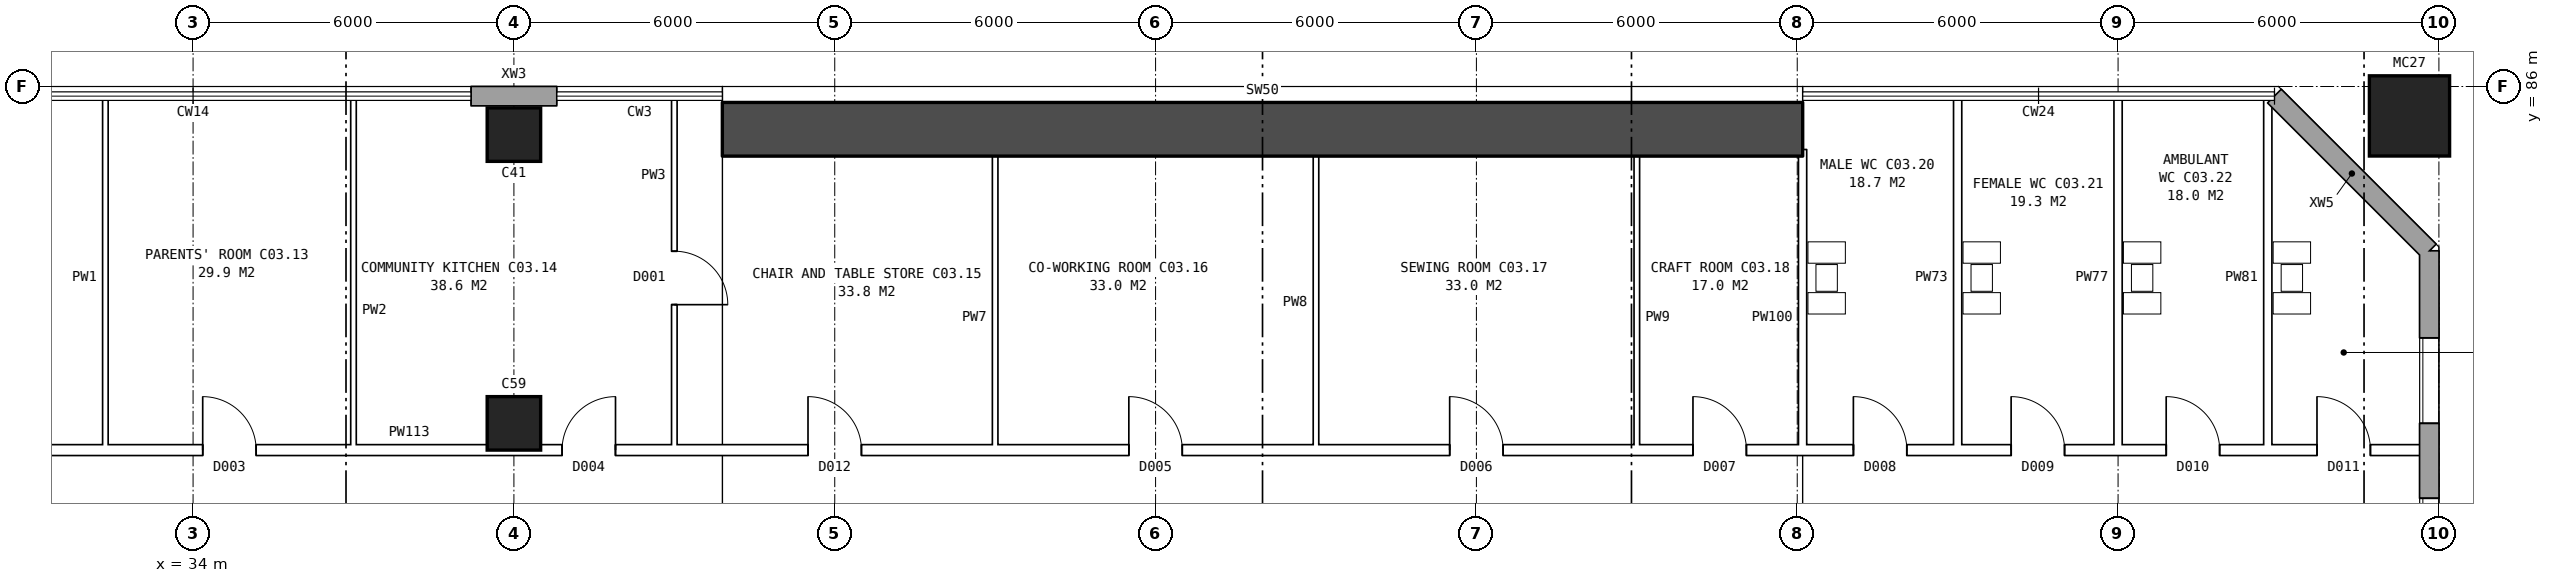
"""IFC4 building model, lengths in metres.
Left out: names, types, materials, properties, quantities, classifications, styles, units other than length and angle.
Written with IfcOpenShell. Run it as: python <this file> out.ifc"""

import sys

from ifc_helpers import new_model, si_unit, direction, frame, frame_2d, origin, origin_2d, place, context, subcontext, project, spatial, rectangle, hollow_rectangle, extrude, element, fill, save


model = new_model("IFC4")
c1 = context("Model", 3, precision=1e-05, world=origin(), true_north=direction((0.0, 1.0)))
c2 = subcontext(c1, "Body", "Model", "MODEL_VIEW")
j1 = project(units=[si_unit("LENGTHUNIT", "METRE"), si_unit("PLANEANGLEUNIT", "RADIAN")], contexts=[c1])
p1 = place(None, origin())
s1 = spatial("IfcSite", under=j1, at=p1, CompositionType="ELEMENT")
p2 = place(p1, origin())
s2 = spatial("IfcBuilding", under=s1, at=p2, CompositionType="ELEMENT")
p3 = place(p2, frame((0.0, 0.0, 14.7)))
s3 = spatial("IfcBuildingStorey", under=s2, at=p3, CompositionType="ELEMENT", Elevation=14.7)
p4 = place(p3, frame((43.9, 85.2, 0.0), z_axis=(0.0, 0.0, 1.0), x_axis=(1.0, 0.0, 0.0)))
e1 = element("IfcWall", 1, at=p4, inside=s3, PredefinedType="SHEAR", context=c2, shape_type="SweptSolid", body=[
    extrude(rectangle(XDim=20.2, YDim=1.0, at=frame_2d((10.1, 0.0))), origin(), (0.0, 0.0, 1.0), 4.0),
])
for number, where, z_axis, x_axis in (
    (2, (40.0, 79.7, 0.0), (0.0, 0.0, 1.0), (1.0, 0.0, 0.0)),
    (3, (40.0, 85.1, 0.0), (0.0, 0.0, 1.0), (1.0, 0.0, 0.0)),
):
    element("IfcColumn", number, at=place(p3, frame(where, z_axis=z_axis, x_axis=x_axis)), inside=s3, PredefinedType="COLUMN", context=c2, shape_type="SweptSolid", body=[
        extrude(rectangle(XDim=1.0, YDim=1.0, at=origin_2d()), origin(), (0.0, 0.0, 1.0), 4.0),
    ])
p5 = place(p3, frame((75.45, 85.45, 0.0), z_axis=(0.0, 0.0, 1.0), x_axis=(1.0, 0.0, 0.0)))
e4 = element("IfcColumn", 4, at=p5, inside=s3, PredefinedType="COLUMN", context=c2, shape_type="SweptSolid", body=[
    extrude(hollow_rectangle(XDim=1.5, YDim=1.5, WallThickness=0.08, at=origin_2d()), origin(), (0.0, 0.0, 1.0), 4.8),
])
p6 = place(p3, frame((75.82, 57.075, 0.0), z_axis=(0.0, 0.0, 1.0), x_axis=(0.0, 1.0, 0.0)))
e5 = element("IfcWall", 5, at=p6, inside=s3, PredefinedType="STANDARD", context=c2, shape_type="SweptSolid", body=[
    extrude(rectangle(XDim=25.851, YDim=0.36, at=frame_2d((12.925, 0.0))), origin(), (0.0, 0.0, 1.0), 4.0),
])
p7 = place(p6, frame((1.625, 0.0, 0.8)))
e6 = element("IfcOpeningElement", 6, at=p7, cuts=e5, PredefinedType="OPENING", context=c2, shape_type="SweptSolid", body=[
    extrude(rectangle(XDim=1.6, YDim=1.8, at=frame_2d((0.8, 0.9))), frame((0.0, 0.19, 0.0), z_axis=(0.0, -1.0, 0.0), x_axis=(1.0, 0.0, 0.0)), (0.0, 0.0, 1.0), 0.38),
])
p8 = place(p6, frame((4.625, 0.0, 0.8)))
e7 = element("IfcOpeningElement", 7, at=p8, cuts=e5, PredefinedType="OPENING", context=c2, shape_type="SweptSolid", body=[
    extrude(rectangle(XDim=1.6, YDim=1.8, at=frame_2d((0.8, 0.9))), frame((0.0, 0.19, 0.0), z_axis=(0.0, -1.0, 0.0), x_axis=(1.0, 0.0, 0.0)), (0.0, 0.0, 1.0), 0.38),
])
p9 = place(p6, frame((19.625, 0.0, 0.8)))
e8 = element("IfcOpeningElement", 8, at=p9, cuts=e5, PredefinedType="OPENING", context=c2, shape_type="SweptSolid", body=[
    extrude(rectangle(XDim=1.6, YDim=1.8, at=frame_2d((0.8, 0.9))), frame((0.0, 0.19, 0.0), z_axis=(0.0, -1.0, 0.0), x_axis=(1.0, 0.0, 0.0)), (0.0, 0.0, 1.0), 0.38),
])
p10 = place(p6, frame((22.625, 0.0, 0.8)))
e9 = element("IfcOpeningElement", 9, at=p10, cuts=e5, PredefinedType="OPENING", context=c2, shape_type="SweptSolid", body=[
    extrude(rectangle(XDim=1.6, YDim=1.8, at=frame_2d((0.8, 0.9))), frame((0.0, 0.19, 0.0), z_axis=(0.0, -1.0, 0.0), x_axis=(1.0, 0.0, 0.0)), (0.0, 0.0, 1.0), 0.38),
])
p11 = place(p3, frame((75.82, 82.925, 0.0), z_axis=(0.0, 0.0, 1.0), x_axis=(-0.707106781187, 0.707106781187, 0.0)))
e10 = element("IfcWall", 10, at=p11, inside=s3, PredefinedType="STANDARD", context=c2, shape_type="SweptSolid", body=[
    extrude(rectangle(XDim=4.094, YDim=0.36, at=frame_2d((2.047, 0.0))), origin(), (0.0, 0.0, 1.0), 4.0),
])
p12 = place(p3, frame((40.8, 85.82, 0.0), z_axis=(0.0, 0.0, 1.0), x_axis=(-1.0, 0.0, 0.0)))
e11 = element("IfcWall", 11, at=p12, inside=s3, PredefinedType="STANDARD", context=c2, shape_type="SweptSolid", body=[
    extrude(rectangle(XDim=1.6, YDim=0.36, at=frame_2d((0.8, 0.0))), origin(), (0.0, 0.0, 1.0), 4.0),
])
p13 = place(p3, frame((28.398, 79.2, 0.0), z_axis=(0.0, 0.0, 1.0), x_axis=(1.0, 0.0, 0.0)))
e12 = element("IfcWall", 12, at=p13, inside=s3, PredefinedType="PARTITIONING", context=c2, shape_type="SweptSolid", body=[
    extrude(rectangle(XDim=47.362, YDim=0.2, at=frame_2d((23.681, 0.0))), origin(), (0.0, 0.0, 1.0), 4.0),
])
p14 = place(p13, frame((1.531, 0.0, 0.0)))
e13 = element("IfcOpeningElement", 13, at=p14, cuts=e12, PredefinedType="OPENING", context=c2, shape_type="SweptSolid", body=[
    extrude(rectangle(XDim=1.0, YDim=2.1, at=frame_2d((0.5, 1.05))), frame((0.0, 0.11, 0.0), z_axis=(0.0, -1.0, 0.0), x_axis=(1.0, 0.0, 0.0)), (0.0, 0.0, 1.0), 0.22),
])
p15 = place(p13, frame((5.782, 0.0, 0.0)))
e14 = element("IfcOpeningElement", 14, at=p15, cuts=e12, PredefinedType="OPENING", context=c2, shape_type="SweptSolid", body=[
    extrude(rectangle(XDim=1.0, YDim=2.1, at=frame_2d((0.5, 1.05))), frame((0.0, 0.11, 0.0), z_axis=(0.0, -1.0, 0.0), x_axis=(1.0, 0.0, 0.0)), (0.0, 0.0, 1.0), 0.22),
])
p16 = place(p13, frame((12.502, 0.0, 0.0)))
e15 = element("IfcOpeningElement", 15, at=p16, cuts=e12, PredefinedType="OPENING", context=c2, shape_type="SweptSolid", body=[
    extrude(rectangle(XDim=1.0, YDim=2.1, at=frame_2d((0.5, 1.05))), frame((0.0, 0.11, 0.0), z_axis=(0.0, -1.0, 0.0), x_axis=(1.0, 0.0, 0.0)), (0.0, 0.0, 1.0), 0.22),
])
p17 = place(p13, frame((17.102, 0.0, 0.0)))
e16 = element("IfcOpeningElement", 16, at=p17, cuts=e12, PredefinedType="OPENING", context=c2, shape_type="SweptSolid", body=[
    extrude(rectangle(XDim=1.0, YDim=2.1, at=frame_2d((0.5, 1.05))), frame((0.0, 0.11, 0.0), z_axis=(0.0, -1.0, 0.0), x_axis=(1.0, 0.0, 0.0)), (0.0, 0.0, 1.0), 0.22),
])
p18 = place(p13, frame((23.102, 0.0, 0.0)))
e17 = element("IfcOpeningElement", 17, at=p18, cuts=e12, PredefinedType="OPENING", context=c2, shape_type="SweptSolid", body=[
    extrude(rectangle(XDim=1.0, YDim=2.1, at=frame_2d((0.5, 1.05))), frame((0.0, 0.11, 0.0), z_axis=(0.0, -1.0, 0.0), x_axis=(1.0, 0.0, 0.0)), (0.0, 0.0, 1.0), 0.22),
])
p19 = place(p13, frame((29.102, 0.0, 0.0)))
e18 = element("IfcOpeningElement", 18, at=p19, cuts=e12, PredefinedType="OPENING", context=c2, shape_type="SweptSolid", body=[
    extrude(rectangle(XDim=1.0, YDim=2.1, at=frame_2d((0.5, 1.05))), frame((0.0, 0.11, 0.0), z_axis=(0.0, -1.0, 0.0), x_axis=(1.0, 0.0, 0.0)), (0.0, 0.0, 1.0), 0.22),
])
p20 = place(p13, frame((33.652, 0.0, 0.0)))
e19 = element("IfcOpeningElement", 19, at=p20, cuts=e12, PredefinedType="OPENING", context=c2, shape_type="SweptSolid", body=[
    extrude(rectangle(XDim=1.0, YDim=2.1, at=frame_2d((0.5, 1.05))), frame((0.0, 0.11, 0.0), z_axis=(0.0, -1.0, 0.0), x_axis=(1.0, 0.0, 0.0)), (0.0, 0.0, 1.0), 0.22),
])
p21 = place(p13, frame((36.652, 0.0, 0.0)))
e20 = element("IfcOpeningElement", 20, at=p21, cuts=e12, PredefinedType="OPENING", context=c2, shape_type="SweptSolid", body=[
    extrude(rectangle(XDim=1.0, YDim=2.1, at=frame_2d((0.5, 1.05))), frame((0.0, 0.11, 0.0), z_axis=(0.0, -1.0, 0.0), x_axis=(1.0, 0.0, 0.0)), (0.0, 0.0, 1.0), 0.22),
])
p22 = place(p13, frame((39.602, 0.0, 0.0)))
e21 = element("IfcOpeningElement", 21, at=p22, cuts=e12, PredefinedType="OPENING", context=c2, shape_type="SweptSolid", body=[
    extrude(rectangle(XDim=1.0, YDim=2.1, at=frame_2d((0.5, 1.05))), frame((0.0, 0.11, 0.0), z_axis=(0.0, -1.0, 0.0), x_axis=(1.0, 0.0, 0.0)), (0.0, 0.0, 1.0), 0.22),
])
p23 = place(p13, frame((42.502, 0.0, 0.0)))
e22 = element("IfcOpeningElement", 22, at=p23, cuts=e12, PredefinedType="OPENING", context=c2, shape_type="SweptSolid", body=[
    extrude(rectangle(XDim=1.0, YDim=2.1, at=frame_2d((0.5, 1.05))), frame((0.0, 0.11, 0.0), z_axis=(0.0, -1.0, 0.0), x_axis=(1.0, 0.0, 0.0)), (0.0, 0.0, 1.0), 0.22),
])
p24 = place(p13, frame((45.322, 0.0, 0.0)))
e23 = element("IfcOpeningElement", 23, at=p24, cuts=e12, PredefinedType="OPENING", context=c2, shape_type="SweptSolid", body=[
    extrude(rectangle(XDim=1.0, YDim=2.1, at=frame_2d((0.5, 1.05))), frame((0.0, 0.11, 0.0), z_axis=(0.0, -1.0, 0.0), x_axis=(1.0, 0.0, 0.0)), (0.0, 0.0, 1.0), 0.22),
])
for number, where, z_axis, x_axis in (
    (24, (32.36, 79.1, 0.0), (0.0, 0.0, 1.0), (0.0, 1.0, 0.0)),
    (25, (37.0, 79.1, 0.0), (0.0, 0.0, 1.0), (0.0, 1.0, 0.0)),
):
    element("IfcWall", number, at=place(p3, frame(where, z_axis=z_axis, x_axis=x_axis)), inside=s3, PredefinedType="PARTITIONING", context=c2, shape_type="SweptSolid", body=[
        extrude(rectangle(XDim=6.66, YDim=0.1, at=frame_2d((3.33, 0.0))), origin(), (0.0, 0.0, 1.0), 4.0),
    ])
p25 = place(p3, frame((43.0, 79.1, 0.0), z_axis=(0.0, 0.0, 1.0), x_axis=(0.0, 1.0, 0.0)))
e26 = element("IfcWall", 26, at=p25, inside=s3, PredefinedType="PARTITIONING", context=c2, shape_type="SweptSolid", body=[
    extrude(rectangle(XDim=6.66, YDim=0.1, at=frame_2d((3.33, 0.0))), origin(), (0.0, 0.0, 1.0), 4.0),
])
p26 = place(p25, frame((2.82, 0.0, 0.0)))
e27 = element("IfcOpeningElement", 27, at=p26, cuts=e26, PredefinedType="OPENING", context=c2, shape_type="SweptSolid", body=[
    extrude(rectangle(XDim=1.0, YDim=2.1, at=frame_2d((0.5, 1.05))), frame((0.0, 0.06, 0.0), z_axis=(0.0, -1.0, 0.0), x_axis=(1.0, 0.0, 0.0)), (0.0, 0.0, 1.0), 0.12),
])
for number, where, z_axis, x_axis in (
    (28, (49.0, 79.1, 0.0), (0.0, 0.0, 1.0), (0.0, 1.0, 0.0)),
    (29, (55.0, 79.1, 0.0), (0.0, 0.0, 1.0), (0.0, 1.0, 0.0)),
    (30, (61.0, 79.1, 0.0), (0.0, 0.0, 1.0), (0.0, 1.0, 0.0)),
):
    element("IfcWall", number, at=place(p3, frame(where, z_axis=z_axis, x_axis=x_axis)), inside=s3, PredefinedType="PARTITIONING", context=c2, shape_type="SweptSolid", body=[
        extrude(rectangle(XDim=5.72, YDim=0.1, at=frame_2d((2.86, 0.0))), origin(), (0.0, 0.0, 1.0), 4.0),
    ])
p27 = place(p3, frame((64.1, 79.1, 0.0), z_axis=(0.0, 0.0, 1.0), x_axis=(0.0, 1.0, 0.0)))
e31 = element("IfcWall", 31, at=p27, inside=s3, PredefinedType="PLUMBINGWALL", context=c2, shape_type="SweptSolid", body=[
    extrude(rectangle(XDim=5.72, YDim=0.15, at=frame_2d((2.86, 0.0))), origin(), (0.0, 0.0, 1.0), 4.0),
])
for number, where, z_axis, x_axis in (
    (32, (67.0, 79.1, 0.0), (0.0, 0.0, 1.0), (0.0, 1.0, 0.0)),
    (33, (70.0, 79.1, 0.0), (0.0, 0.0, 1.0), (0.0, 1.0, 0.0)),
    (34, (72.8, 79.1, 0.0), (0.0, 0.0, 1.0), (0.0, 1.0, 0.0)),
):
    element("IfcWall", number, at=place(p3, frame(where, z_axis=z_axis, x_axis=x_axis)), inside=s3, PredefinedType="PLUMBINGWALL", context=c2, shape_type="SweptSolid", body=[
        extrude(rectangle(XDim=6.66, YDim=0.15, at=frame_2d((3.33, 0.0))), origin(), (0.0, 0.0, 1.0), 4.0),
    ])
p28 = place(p9, origin())
e35 = element("IfcWindow", 35, at=p28, inside=s3, PartitioningType="SINGLE_PANEL", PredefinedType="WINDOW", context=c2, shape_type="SweptSolid", body=[
    extrude(rectangle(XDim=1.6, YDim=1.8, at=frame_2d((0.8, 0.9))), frame((0.0, 0.15, 0.0), z_axis=(0.0, -1.0, 0.0), x_axis=(1.0, 0.0, 0.0)), (0.0, 0.0, 1.0), 0.06),
])
fill(e8, e35)
p29 = place(p10, origin())
e36 = element("IfcWindow", 36, at=p29, inside=s3, PartitioningType="SINGLE_PANEL", PredefinedType="WINDOW", context=c2, shape_type="SweptSolid", body=[
    extrude(rectangle(XDim=1.6, YDim=1.8, at=frame_2d((0.8, 0.9))), frame((0.0, 0.15, 0.0), z_axis=(0.0, -1.0, 0.0), x_axis=(1.0, 0.0, 0.0)), (0.0, 0.0, 1.0), 0.06),
])
fill(e9, e36)
p30 = place(p15, origin())
e37 = element("IfcDoor", 37, at=p30, inside=s3, OperationType="SINGLE_SWING_LEFT", PredefinedType="DOOR", context=c2, shape_type="SweptSolid", body=[
    extrude(rectangle(XDim=1.0, YDim=2.1, at=frame_2d((0.5, 1.05))), frame((0.0, 0.025, 0.0), z_axis=(0.0, -1.0, 0.0), x_axis=(1.0, 0.0, 0.0)), (0.0, 0.0, 1.0), 0.05),
])
fill(e14, e37)
p31 = place(p16, origin())
e38 = element("IfcDoor", 38, at=p31, inside=s3, OperationType="SINGLE_SWING_RIGHT", PredefinedType="DOOR", context=c2, shape_type="SweptSolid", body=[
    extrude(rectangle(XDim=1.0, YDim=2.1, at=frame_2d((0.5, 1.05))), frame((0.0, 0.025, 0.0), z_axis=(0.0, -1.0, 0.0), x_axis=(1.0, 0.0, 0.0)), (0.0, 0.0, 1.0), 0.05),
])
fill(e15, e38)
p32 = place(p17, origin())
e39 = element("IfcDoor", 39, at=p32, inside=s3, OperationType="SINGLE_SWING_LEFT", PredefinedType="DOOR", context=c2, shape_type="SweptSolid", body=[
    extrude(rectangle(XDim=1.0, YDim=2.1, at=frame_2d((0.5, 1.05))), frame((0.0, 0.025, 0.0), z_axis=(0.0, -1.0, 0.0), x_axis=(1.0, 0.0, 0.0)), (0.0, 0.0, 1.0), 0.05),
])
fill(e16, e39)
p33 = place(p18, origin())
e40 = element("IfcDoor", 40, at=p33, inside=s3, OperationType="SINGLE_SWING_LEFT", PredefinedType="DOOR", context=c2, shape_type="SweptSolid", body=[
    extrude(rectangle(XDim=1.0, YDim=2.1, at=frame_2d((0.5, 1.05))), frame((0.0, 0.025, 0.0), z_axis=(0.0, -1.0, 0.0), x_axis=(1.0, 0.0, 0.0)), (0.0, 0.0, 1.0), 0.05),
])
fill(e17, e40)
p34 = place(p19, origin())
e41 = element("IfcDoor", 41, at=p34, inside=s3, OperationType="SINGLE_SWING_LEFT", PredefinedType="DOOR", context=c2, shape_type="SweptSolid", body=[
    extrude(rectangle(XDim=1.0, YDim=2.1, at=frame_2d((0.5, 1.05))), frame((0.0, 0.025, 0.0), z_axis=(0.0, -1.0, 0.0), x_axis=(1.0, 0.0, 0.0)), (0.0, 0.0, 1.0), 0.05),
])
fill(e18, e41)
p35 = place(p20, origin())
e42 = element("IfcDoor", 42, at=p35, inside=s3, OperationType="SINGLE_SWING_LEFT", PredefinedType="DOOR", context=c2, shape_type="SweptSolid", body=[
    extrude(rectangle(XDim=1.0, YDim=2.1, at=frame_2d((0.5, 1.05))), frame((0.0, 0.025, 0.0), z_axis=(0.0, -1.0, 0.0), x_axis=(1.0, 0.0, 0.0)), (0.0, 0.0, 1.0), 0.05),
])
fill(e19, e42)
p36 = place(p21, origin())
e43 = element("IfcDoor", 43, at=p36, inside=s3, OperationType="SINGLE_SWING_LEFT", PredefinedType="DOOR", context=c2, shape_type="SweptSolid", body=[
    extrude(rectangle(XDim=1.0, YDim=2.1, at=frame_2d((0.5, 1.05))), frame((0.0, 0.025, 0.0), z_axis=(0.0, -1.0, 0.0), x_axis=(1.0, 0.0, 0.0)), (0.0, 0.0, 1.0), 0.05),
])
fill(e20, e43)
p37 = place(p22, origin())
e44 = element("IfcDoor", 44, at=p37, inside=s3, OperationType="SINGLE_SWING_LEFT", PredefinedType="DOOR", context=c2, shape_type="SweptSolid", body=[
    extrude(rectangle(XDim=1.0, YDim=2.1, at=frame_2d((0.5, 1.05))), frame((0.0, 0.025, 0.0), z_axis=(0.0, -1.0, 0.0), x_axis=(1.0, 0.0, 0.0)), (0.0, 0.0, 1.0), 0.05),
])
fill(e21, e44)
p38 = place(p23, origin())
e45 = element("IfcDoor", 45, at=p38, inside=s3, OperationType="SINGLE_SWING_LEFT", PredefinedType="DOOR", context=c2, shape_type="SweptSolid", body=[
    extrude(rectangle(XDim=1.0, YDim=2.1, at=frame_2d((0.5, 1.05))), frame((0.0, 0.025, 0.0), z_axis=(0.0, -1.0, 0.0), x_axis=(1.0, 0.0, 0.0)), (0.0, 0.0, 1.0), 0.05),
])
fill(e22, e45)
p39 = place(p24, origin())
e46 = element("IfcDoor", 46, at=p39, inside=s3, OperationType="SINGLE_SWING_LEFT", PredefinedType="DOOR", context=c2, shape_type="SweptSolid", body=[
    extrude(rectangle(XDim=1.0, YDim=2.1, at=frame_2d((0.5, 1.05))), frame((0.0, 0.025, 0.0), z_axis=(0.0, -1.0, 0.0), x_axis=(1.0, 0.0, 0.0)), (0.0, 0.0, 1.0), 0.05),
])
fill(e23, e46)
p40 = place(p26, frame((1.0, 0.0, 0.0), z_axis=(0.0, 0.0, 1.0), x_axis=(-1.0, 0.0, 0.0)))
e47 = element("IfcDoor", 47, at=p40, inside=s3, OperationType="SINGLE_SWING_RIGHT", PredefinedType="DOOR", context=c2, shape_type="SweptSolid", body=[
    extrude(rectangle(XDim=1.0, YDim=2.1, at=frame_2d((0.5, 1.05))), frame((0.0, 0.025, 0.0), z_axis=(0.0, -1.0, 0.0), x_axis=(1.0, 0.0, 0.0)), (0.0, 0.0, 1.0), 0.05),
])
fill(e27, e47)
save(model, sys.argv[1])
